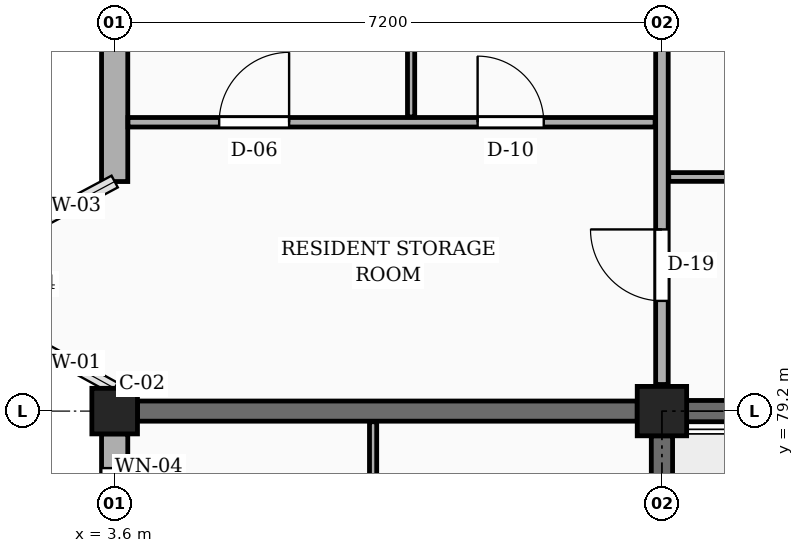
"""IFC4 building model, lengths in metres.
Left out: names, types, materials, properties, quantities, classifications, styles, units other than length and angle.
Written with IfcOpenShell. Run it as: python <this file> out.ifc"""

import sys

from ifc_helpers import new_model, si_unit, direction, frame, frame_2d, origin, origin_2d, place, context, subcontext, project, spatial, rectangle, extrude, element, fill, save


model = new_model("IFC4")
c1 = context("Model", 3, precision=1e-05, world=origin(), true_north=direction((0.0, 1.0)))
c2 = subcontext(c1, "Body", "Model", "MODEL_VIEW")
j1 = project(units=[si_unit("LENGTHUNIT", "METRE"), si_unit("PLANEANGLEUNIT", "RADIAN")], contexts=[c1])
p1 = place(None, origin())
s1 = spatial("IfcSite", under=j1, at=p1, CompositionType="ELEMENT")
p2 = place(p1, origin())
s2 = spatial("IfcBuilding", under=s1, at=p2, CompositionType="ELEMENT")
p3 = place(p2, frame((0.0, 0.0, 7.65)))
s3 = spatial("IfcBuildingStorey", under=s2, at=p3, CompositionType="ELEMENT", Elevation=7.65)
p4 = place(p3, frame((3.6, 79.2, 0.0), z_axis=(0.0, 0.0, 1.0), x_axis=(1.0, 0.0, 0.0)))
e1 = element("IfcColumn", 1, at=p4, inside=s3, PredefinedType="COLUMN", context=c2, shape_type="SweptSolid", body=[
    extrude(rectangle(XDim=0.6, YDim=0.6, at=origin_2d()), origin(), (0.0, 0.0, 1.0), 3.15),
])
p5 = place(p3, frame((10.8, 79.2, 0.0), z_axis=(0.0, 0.0, 1.0), x_axis=(1.0, 0.0, 0.0)))
e2 = element("IfcColumn", 2, at=p5, inside=s3, PredefinedType="COLUMN", context=c2, shape_type="SweptSolid", body=[
    extrude(rectangle(XDim=0.65, YDim=0.65, at=origin_2d()), origin(), (0.0, 0.0, 1.0), 3.15),
])
p6 = place(p3, frame((3.9, 79.2, 0.0), z_axis=(0.0, 0.0, 1.0), x_axis=(1.0, 0.0, 0.0)))
e3 = element("IfcWall", 3, at=p6, inside=s3, PredefinedType="SOLIDWALL", context=c2, shape_type="SweptSolid", body=[
    extrude(rectangle(XDim=6.575, YDim=0.265, at=frame_2d((3.288, 0.0))), origin(), (0.0, 0.0, 1.0), 2.21),
])
p7 = place(p3, frame((3.6, 86.1, 0.0), z_axis=(0.0, 0.0, 1.0), x_axis=(0.0, -1.0, 0.0)))
e4 = element("IfcWall", 4, at=p7, inside=s3, PredefinedType="SOLIDWALL", context=c2, shape_type="SweptSolid", body=[
    extrude(rectangle(XDim=3.88, YDim=0.345, at=frame_2d((1.94, 0.0))), origin(), (0.0, 0.0, 1.0), 2.48),
])
p8 = place(p7, frame((1.105, 0.0, 0.78)))
e5 = element("IfcOpeningElement", 5, at=p8, cuts=e4, PredefinedType="OPENING", context=c2, shape_type="SweptSolid", body=[
    extrude(rectangle(XDim=1.0, YDim=1.15, at=frame_2d((0.5, 0.575))), frame((0.0, 0.183, 0.0), z_axis=(0.0, -1.0, 0.0), x_axis=(1.0, 0.0, 0.0)), (0.0, 0.0, 1.0), 0.365),
])
p9 = place(p3, frame((3.6, 78.9, 0.0), z_axis=(0.0, 0.0, 1.0), x_axis=(0.0, -1.0, 0.0)))
e6 = element("IfcWall", 6, at=p9, inside=s3, PredefinedType="SOLIDWALL", context=c2, shape_type="SweptSolid", body=[
    extrude(rectangle(XDim=6.6, YDim=0.345, at=frame_2d((3.3, 0.0))), origin(), (0.0, 0.0, 1.0), 2.48),
])
p10 = place(p9, frame((0.45, 0.0, 0.78)))
e7 = element("IfcOpeningElement", 7, at=p10, cuts=e6, PredefinedType="OPENING", context=c2, shape_type="SweptSolid", body=[
    extrude(rectangle(XDim=1.08, YDim=1.15, at=frame_2d((0.54, 0.575))), frame((0.0, 0.183, 0.0), z_axis=(0.0, -1.0, 0.0), x_axis=(1.0, 0.0, 0.0)), (0.0, 0.0, 1.0), 0.365),
])
p11 = place(p9, frame((4.65, 0.0, 0.78)))
e8 = element("IfcOpeningElement", 8, at=p11, cuts=e6, PredefinedType="OPENING", context=c2, shape_type="SweptSolid", body=[
    extrude(rectangle(XDim=1.24, YDim=1.15, at=frame_2d((0.62, 0.575))), frame((0.0, 0.183, 0.0), z_axis=(0.0, -1.0, 0.0), x_axis=(1.0, 0.0, 0.0)), (0.0, 0.0, 1.0), 0.365),
])
for number, where, z_axis, x_axis in (
    (9, (10.8, 72.325, 0.0), (0.0, 0.0, 1.0), (0.0, 1.0, 0.0)),
    (10, (11.125, 79.2, 0.0), (0.0, 0.0, 1.0), (1.0, 0.0, 0.0)),
):
    element("IfcWall", number, at=place(p3, frame(where, z_axis=z_axis, x_axis=x_axis)), inside=s3, PredefinedType="SHEAR", context=c2, shape_type="SweptSolid", body=[
        extrude(rectangle(XDim=6.55, YDim=0.28, at=frame_2d((3.275, 0.0))), origin(), (0.0, 0.0, 1.0), 2.91),
    ])
p12 = place(p3, frame((10.8, 79.55, 0.0), z_axis=(0.0, 0.0, 1.0), x_axis=(0.0, 1.0, 0.0)))
e11 = element("IfcWall", 11, at=p12, inside=s3, PredefinedType="PARTITIONING", context=c2, shape_type="SweptSolid", body=[
    extrude(rectangle(XDim=6.5, YDim=0.165, at=frame_2d((3.25, 0.0))), origin(), (0.0, 0.0, 1.0), 2.26),
])
p13 = place(p12, frame((1.1, 0.0, 0.0)))
e12 = element("IfcOpeningElement", 12, at=p13, cuts=e11, PredefinedType="OPENING", context=c2, shape_type="SweptSolid", body=[
    extrude(rectangle(XDim=0.94, YDim=2.12, at=frame_2d((0.47, 1.06))), frame((0.0, 0.093, 0.0), z_axis=(0.0, -1.0, 0.0), x_axis=(1.0, 0.0, 0.0)), (0.0, 0.0, 1.0), 0.185),
])
p14 = place(p3, frame((7.0, 75.37, 0.0), z_axis=(0.0, 0.0, 1.0), x_axis=(0.0, 1.0, 0.0)))
e13 = element("IfcWall", 13, at=p14, inside=s3, PredefinedType="PARTITIONING", context=c2, shape_type="SweptSolid", body=[
    extrude(rectangle(XDim=3.69, YDim=0.095, at=frame_2d((1.845, 0.0))), origin(), (0.0, 0.0, 1.0), 2.345),
])
p15 = place(p3, frame((10.89, 82.28, 0.0), z_axis=(0.0, 0.0, 1.0), x_axis=(1.0, 0.0, 0.0)))
e14 = element("IfcWall", 14, at=p15, inside=s3, PredefinedType="PARTITIONING", context=c2, shape_type="SweptSolid", body=[
    extrude(rectangle(XDim=7.02, YDim=0.115, at=frame_2d((3.51, 0.0))), origin(), (0.0, 0.0, 1.0), 2.345),
])
p16 = place(p15, frame((2.85, 0.0, 0.0)))
e15 = element("IfcOpeningElement", 15, at=p16, cuts=e14, PredefinedType="OPENING", context=c2, shape_type="SweptSolid", body=[
    extrude(rectangle(XDim=1.02, YDim=2.15, at=frame_2d((0.51, 1.075))), frame((0.0, 0.067, 0.0), z_axis=(0.0, -1.0, 0.0), x_axis=(1.0, 0.0, 0.0)), (0.0, 0.0, 1.0), 0.135),
])
p17 = place(p3, frame((3.775, 83.0, 0.0), z_axis=(0.0, 0.0, 1.0), x_axis=(1.0, 0.0, 0.0)))
e16 = element("IfcWall", 16, at=p17, inside=s3, PredefinedType="PARTITIONING", context=c2, shape_type="SweptSolid", body=[
    extrude(rectangle(XDim=6.935, YDim=0.125, at=frame_2d((3.468, 0.0))), origin(), (0.0, 0.0, 1.0), 2.345),
])
p18 = place(p17, frame((4.6, 0.0, 0.0)))
e17 = element("IfcOpeningElement", 17, at=p18, cuts=e16, PredefinedType="OPENING", context=c2, shape_type="SweptSolid", body=[
    extrude(rectangle(XDim=0.87, YDim=2.05, at=frame_2d((0.435, 1.025))), frame((0.0, 0.073, 0.0), z_axis=(0.0, -1.0, 0.0), x_axis=(1.0, 0.0, 0.0)), (0.0, 0.0, 1.0), 0.145),
])
p19 = place(p17, frame((1.2, 0.0, 0.0)))
e18 = element("IfcOpeningElement", 18, at=p19, cuts=e16, PredefinedType="OPENING", context=c2, shape_type="SweptSolid", body=[
    extrude(rectangle(XDim=0.92, YDim=2.1, at=frame_2d((0.46, 1.05))), frame((0.0, 0.073, 0.0), z_axis=(0.0, -1.0, 0.0), x_axis=(1.0, 0.0, 0.0)), (0.0, 0.0, 1.0), 0.145),
])
p20 = place(p3, frame((7.5, 83.07, 0.0), z_axis=(0.0, 0.0, 1.0), x_axis=(0.0, 1.0, 0.0)))
e19 = element("IfcWall", 19, at=p20, inside=s3, PredefinedType="PARTITIONING", context=c2, shape_type="SweptSolid", body=[
    extrude(rectangle(XDim=3.19, YDim=0.095, at=frame_2d((1.595, 0.0))), origin(), (0.0, 0.0, 1.0), 2.345),
])
p21 = place(p10, origin())
e20 = element("IfcWindow", 20, at=p21, inside=s3, PartitioningType="SINGLE_PANEL", PredefinedType="WINDOW", context=c2, shape_type="SweptSolid", body=[
    extrude(rectangle(XDim=1.08, YDim=1.15, at=frame_2d((0.54, 0.575))), frame((0.0, 0.03, 0.0), z_axis=(0.0, -1.0, 0.0), x_axis=(1.0, 0.0, 0.0)), (0.0, 0.0, 1.0), 0.06),
])
fill(e7, e20)
p22 = place(p13, origin())
e21 = element("IfcDoor", 21, at=p22, inside=s3, OperationType="SINGLE_SWING_RIGHT", PredefinedType="DOOR", context=c2, shape_type="SweptSolid", body=[
    extrude(rectangle(XDim=0.94, YDim=2.12, at=frame_2d((0.47, 1.06))), frame((0.0, 0.025, 0.0), z_axis=(0.0, -1.0, 0.0), x_axis=(1.0, 0.0, 0.0)), (0.0, 0.0, 1.0), 0.05),
])
fill(e12, e21)
p23 = place(p18, origin())
e22 = element("IfcDoor", 22, at=p23, inside=s3, OperationType="SINGLE_SWING_LEFT", PredefinedType="DOOR", context=c2, shape_type="SweptSolid", body=[
    extrude(rectangle(XDim=0.87, YDim=2.05, at=frame_2d((0.435, 1.025))), frame((0.0, 0.025, 0.0), z_axis=(0.0, -1.0, 0.0), x_axis=(1.0, 0.0, 0.0)), (0.0, 0.0, 1.0), 0.05),
])
fill(e17, e22)
p24 = place(p19, origin())
e23 = element("IfcDoor", 23, at=p24, inside=s3, OperationType="SINGLE_SWING_RIGHT", PredefinedType="DOOR", context=c2, shape_type="SweptSolid", body=[
    extrude(rectangle(XDim=0.92, YDim=2.1, at=frame_2d((0.46, 1.05))), frame((0.0, 0.025, 0.0), z_axis=(0.0, -1.0, 0.0), x_axis=(1.0, 0.0, 0.0)), (0.0, 0.0, 1.0), 0.05),
])
fill(e18, e23)
save(model, sys.argv[1])
